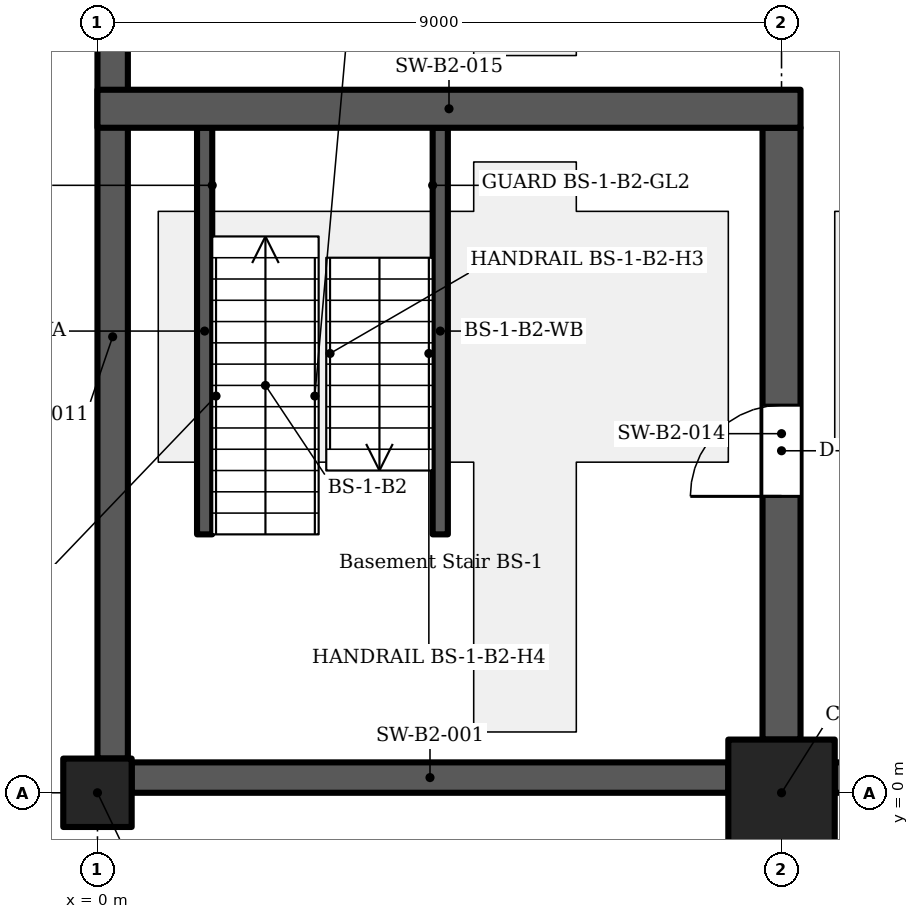
"""IFC4 building model, lengths in metres.
Left out: names, types, materials, properties, quantities, classifications, styles, units other than length and angle.
Written with IfcOpenShell. Run it as: python <this file> out.ifc"""

import sys

from ifc_helpers import new_model, si_unit, direction, frame, frame_2d, origin, origin_with_axes, origin_2d, place, context, subcontext, project, spatial, rectangle, extrude, element, fill, save


model = new_model("IFC4")
c1 = context("Model", 3, precision=1e-05, world=origin(), true_north=direction((0.0, 1.0)))
c2 = subcontext(c1, "Body", "Model", "MODEL_VIEW")
j1 = project(units=[si_unit("LENGTHUNIT", "METRE"), si_unit("PLANEANGLEUNIT", "RADIAN")], contexts=[c1])
p1 = place(None, origin())
s1 = spatial("IfcSite", under=j1, at=p1, CompositionType="ELEMENT")
p2 = place(p1, origin())
s2 = spatial("IfcBuilding", under=s1, at=p2, CompositionType="ELEMENT")
p3 = place(p2, frame((0.0, 0.0, -8.4)))
s3 = spatial("IfcBuildingStorey", under=s2, at=p3, CompositionType="ELEMENT", Elevation=-8.4)
p4 = place(p3, origin_with_axes())
e1 = element("IfcColumn", 1, at=p4, inside=s3, PredefinedType="COLUMN", context=c2, shape_type="SweptSolid", body=[
    extrude(rectangle(XDim=0.9, YDim=0.9, at=origin_2d()), origin(), (0.0, 0.0, 1.0), 4.2),
])
p5 = place(p3, frame((9.0, 0.0, 0.0), z_axis=(0.0, 0.0, 1.0), x_axis=(1.0, 0.0, 0.0)))
e2 = element("IfcColumn", 2, at=p5, inside=s3, PredefinedType="COLUMN", context=c2, shape_type="SweptSolid", body=[
    extrude(rectangle(XDim=1.4, YDim=1.4, at=origin_2d()), origin(), (0.0, 0.0, 1.0), 4.2),
])
p6 = place(p3, frame((0.45, 0.2, 0.0), z_axis=(0.0, 0.0, 1.0), x_axis=(1.0, 0.0, 0.0)))
e3 = element("IfcWall", 3, at=p6, inside=s3, PredefinedType="SOLIDWALL", context=c2, shape_type="SweptSolid", body=[
    extrude(rectangle(XDim=7.85, YDim=0.4, at=frame_2d((3.925, 0.0))), origin(), (0.0, 0.0, 1.0), 3.8),
])
p7 = place(p3, frame((9.7, 0.2, 0.0), z_axis=(0.0, 0.0, 1.0), x_axis=(1.0, 0.0, 0.0)))
e4 = element("IfcWall", 4, at=p7, inside=s3, PredefinedType="SOLIDWALL", context=c2, shape_type="SweptSolid", body=[
    extrude(rectangle(XDim=7.6, YDim=0.4, at=frame_2d((3.8, 0.0))), origin(), (0.0, 0.0, 1.0), 3.8),
])
p8 = place(p3, frame((0.2, 0.45, 0.0), z_axis=(0.0, 0.0, 1.0), x_axis=(0.0, 1.0, 0.0)))
e5 = element("IfcWall", 5, at=p8, inside=s3, PredefinedType="SOLIDWALL", context=c2, shape_type="SweptSolid", body=[
    extrude(rectangle(XDim=11.1, YDim=0.4, at=frame_2d((5.55, 0.0))), origin(), (0.0, 0.0, 1.0), 3.8),
])
p9 = place(p3, frame((9.0, 0.7, 0.0), z_axis=(0.0, 0.0, 1.0), x_axis=(0.0, 1.0, 0.0)))
e6 = element("IfcWall", 6, at=p9, inside=s3, PredefinedType="SHEAR", context=c2, shape_type="SweptSolid", body=[
    extrude(rectangle(XDim=8.05, YDim=0.5, at=frame_2d((4.025, 0.0))), origin(), (0.0, 0.0, 1.0), 3.8),
])
p10 = place(p9, frame((3.2, 0.0, 0.0)))
e7 = element("IfcOpeningElement", 7, at=p10, cuts=e6, PredefinedType="OPENING", context=c2, shape_type="SweptSolid", body=[
    extrude(rectangle(XDim=1.2, YDim=2.1, at=frame_2d((0.6, 1.05))), frame((0.0, 0.26, 0.0), z_axis=(0.0, -1.0, 0.0), x_axis=(1.0, 0.0, 0.0)), (0.0, 0.0, 1.0), 0.52),
])
p11 = place(p3, frame((0.0, 9.0, 0.0), z_axis=(0.0, 0.0, 1.0), x_axis=(1.0, 0.0, 0.0)))
e8 = element("IfcWall", 8, at=p11, inside=s3, PredefinedType="SHEAR", context=c2, shape_type="SweptSolid", body=[
    extrude(rectangle(XDim=9.25, YDim=0.5, at=frame_2d((4.625, 0.0))), origin(), (0.0, 0.0, 1.0), 3.8),
])
for number, where, z_axis, x_axis in (
    (9, (1.41, 3.4, 0.0), (0.0, 0.0, 1.0), (0.0, 1.0, 0.0)),
    (10, (4.51, 3.4, 0.0), (0.0, 0.0, 1.0), (0.0, 1.0, 0.0)),
):
    element("IfcWall", number, at=place(p3, frame(where, z_axis=z_axis, x_axis=x_axis)), inside=s3, PredefinedType="SHEAR", context=c2, shape_type="SweptSolid", body=[
        extrude(rectangle(XDim=5.35, YDim=0.2, at=frame_2d((2.675, 0.0))), origin(), (0.0, 0.0, 1.0), 3.8),
    ])
p12 = place(p10, origin())
e11 = element("IfcDoor", 11, at=p12, inside=s3, OperationType="SINGLE_SWING_LEFT", PredefinedType="DOOR", context=c2, shape_type="SweptSolid", body=[
    extrude(rectangle(XDim=1.2, YDim=2.1, at=frame_2d((0.6, 1.05))), frame((0.0, 0.025, 0.0), z_axis=(0.0, -1.0, 0.0), x_axis=(1.0, 0.0, 0.0)), (0.0, 0.0, 1.0), 0.05),
])
fill(e7, e11)
save(model, sys.argv[1])
